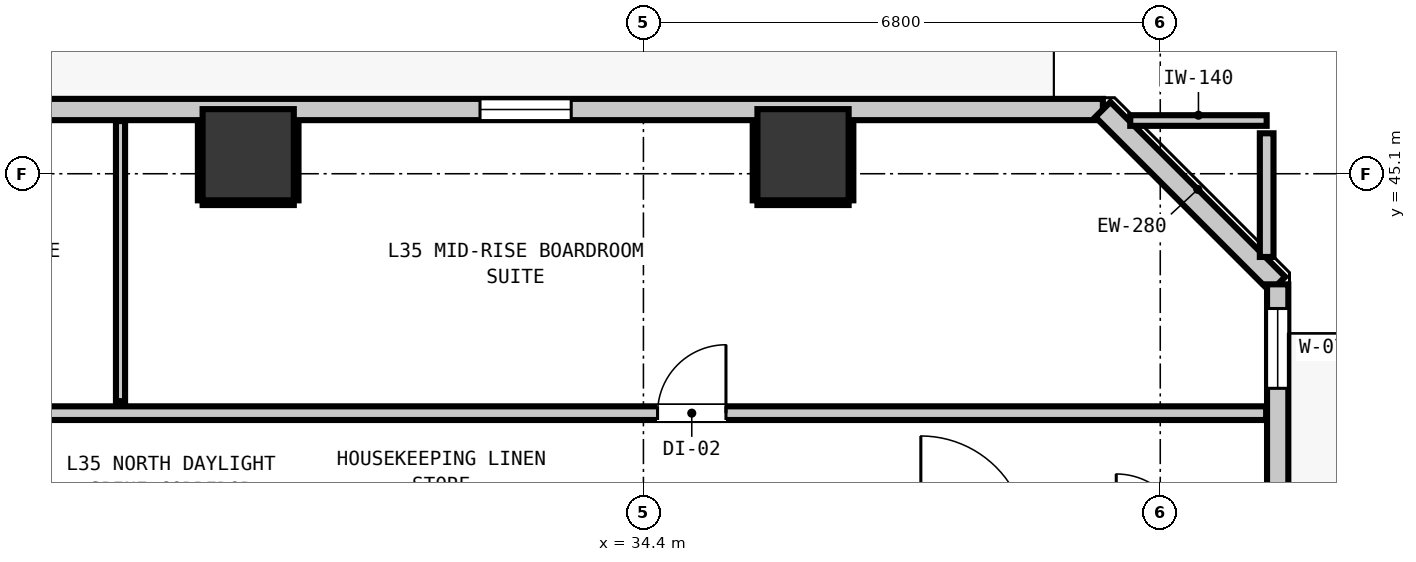
"""IFC4 building model, lengths in metres.
Left out: names, types, materials, properties, quantities, classifications, styles, units other than length and angle.
Written with IfcOpenShell. Run it as: python <this file> out.ifc"""

import sys

from ifc_helpers import new_model, si_unit, direction, frame, frame_2d, origin, origin_2d, place, context, subcontext, project, spatial, rectangle, extrude, element, fill, save


model = new_model("IFC4")
c1 = context("Model", 3, precision=1e-05, world=origin(), true_north=direction((0.0, 1.0)))
c2 = subcontext(c1, "Body", "Model", "MODEL_VIEW")
j1 = project(units=[si_unit("LENGTHUNIT", "METRE"), si_unit("PLANEANGLEUNIT", "RADIAN")], contexts=[c1])
p1 = place(None, origin())
s1 = spatial("IfcSite", under=j1, at=p1, CompositionType="ELEMENT")
p2 = place(p1, origin())
s2 = spatial("IfcBuilding", under=s1, at=p2, CompositionType="ELEMENT")
p3 = place(p2, frame((0.0, 0.0, 122.68)))
s3 = spatial("IfcBuildingStorey", under=s2, at=p3, CompositionType="ELEMENT", Elevation=122.68)
for number, where, z_axis, x_axis in (
    (1, (29.2, 45.35, 0.0), (0.0, 0.0, 1.0), (1.0, 0.0, 0.0)),
    (2, (36.5, 45.35, 0.0), (0.0, 0.0, 1.0), (1.0, 0.0, 0.0)),
):
    element("IfcColumn", number, at=place(p3, frame(where, z_axis=z_axis, x_axis=x_axis)), inside=s3, PredefinedType="COLUMN", context=c2, shape_type="SweptSolid", body=[
        extrude(rectangle(XDim=1.2, YDim=1.2, at=origin_2d()), origin(), (0.0, 0.0, 1.0), 2.9),
    ])
p4 = place(p3, frame((5.355, 45.945, 0.0), z_axis=(0.0, 0.0, 1.0), x_axis=(1.0, 0.0, 0.0)))
e3 = element("IfcWall", 3, at=p4, inside=s3, PredefinedType="STANDARD", context=c2, shape_type="SweptSolid", body=[
    extrude(rectangle(XDim=35.09, YDim=0.28, at=frame_2d((17.545, 0.0))), origin(), (0.0, 0.0, 1.0), 2.9),
])
p5 = place(p4, frame((0.904, 0.0, 0.0)))
e4 = element("IfcOpeningElement", 4, at=p5, cuts=e3, PredefinedType="OPENING", context=c2, shape_type="SweptSolid", body=[
    extrude(rectangle(XDim=1.0, YDim=2.15, at=frame_2d((0.5, 1.075))), frame((0.0, 0.15, 0.0), z_axis=(0.0, -1.0, 0.0), x_axis=(1.0, 0.0, 0.0)), (0.0, 0.0, 1.0), 0.3),
])
p6 = place(p4, frame((3.634, 0.0, 0.85)))
e5 = element("IfcOpeningElement", 5, at=p6, cuts=e3, PredefinedType="OPENING", context=c2, shape_type="SweptSolid", body=[
    extrude(rectangle(XDim=1.2, YDim=1.8, at=frame_2d((0.6, 0.9))), frame((0.0, 0.15, 0.0), z_axis=(0.0, -1.0, 0.0), x_axis=(1.0, 0.0, 0.0)), (0.0, 0.0, 1.0), 0.3),
])
p7 = place(p4, frame((18.455, 0.0, 0.85)))
e6 = element("IfcOpeningElement", 6, at=p7, cuts=e3, PredefinedType="OPENING", context=c2, shape_type="SweptSolid", body=[
    extrude(rectangle(XDim=1.2, YDim=1.8, at=frame_2d((0.6, 0.9))), frame((0.0, 0.15, 0.0), z_axis=(0.0, -1.0, 0.0), x_axis=(1.0, 0.0, 0.0)), (0.0, 0.0, 1.0), 0.3),
])
p8 = place(p4, frame((26.895, 0.0, 0.85)))
e7 = element("IfcOpeningElement", 7, at=p8, cuts=e3, PredefinedType="OPENING", context=c2, shape_type="SweptSolid", body=[
    extrude(rectangle(XDim=1.2, YDim=1.8, at=frame_2d((0.6, 0.9))), frame((0.0, 0.15, 0.0), z_axis=(0.0, -1.0, 0.0), x_axis=(1.0, 0.0, 0.0)), (0.0, 0.0, 1.0), 0.3),
])
p9 = place(p3, frame((40.445, 45.945, 0.0), z_axis=(0.0, 0.0, 1.0), x_axis=(0.707106781187, -0.707106781187, 0.0)))
e8 = element("IfcWall", 8, at=p9, inside=s3, PredefinedType="STANDARD", context=c2, shape_type="SweptSolid", body=[
    extrude(rectangle(XDim=3.253, YDim=0.28, at=frame_2d((1.626, 0.0))), origin(), (0.0, 0.0, 1.0), 2.9),
])
p10 = place(p3, frame((42.745, 43.645, 0.0), z_axis=(0.0, 0.0, 1.0), x_axis=(0.0, -1.0, 0.0)))
e9 = element("IfcWall", 9, at=p10, inside=s3, PredefinedType="STANDARD", context=c2, shape_type="SweptSolid", body=[
    extrude(rectangle(XDim=32.29, YDim=0.28, at=frame_2d((16.145, 0.0))), origin(), (0.0, 0.0, 1.0), 2.9),
])
p11 = place(p10, frame((5.467, 0.0, 0.0)))
e10 = element("IfcOpeningElement", 10, at=p11, cuts=e9, PredefinedType="OPENING", context=c2, shape_type="SweptSolid", body=[
    extrude(rectangle(XDim=1.0, YDim=2.15, at=frame_2d((0.5, 1.075))), frame((0.0, 0.15, 0.0), z_axis=(0.0, -1.0, 0.0), x_axis=(1.0, 0.0, 0.0)), (0.0, 0.0, 1.0), 0.3),
])
p12 = place(p10, frame((28.998, 0.0, 0.85)))
e11 = element("IfcOpeningElement", 11, at=p12, cuts=e9, PredefinedType="OPENING", context=c2, shape_type="SweptSolid", body=[
    extrude(rectangle(XDim=1.2, YDim=1.8, at=frame_2d((0.6, 0.9))), frame((0.0, 0.15, 0.0), z_axis=(0.0, -1.0, 0.0), x_axis=(1.0, 0.0, 0.0)), (0.0, 0.0, 1.0), 0.3),
])
p13 = place(p10, frame((0.318, 0.0, 0.85)))
e12 = element("IfcOpeningElement", 12, at=p13, cuts=e9, PredefinedType="OPENING", context=c2, shape_type="SweptSolid", body=[
    extrude(rectangle(XDim=1.05, YDim=1.65, at=frame_2d((0.525, 0.825))), frame((0.0, 0.15, 0.0), z_axis=(0.0, -1.0, 0.0), x_axis=(1.0, 0.0, 0.0)), (0.0, 0.0, 1.0), 0.3),
])
p14 = place(p10, frame((15.783, 0.0, 0.85)))
e13 = element("IfcOpeningElement", 13, at=p14, cuts=e9, PredefinedType="OPENING", context=c2, shape_type="SweptSolid", body=[
    extrude(rectangle(XDim=1.2, YDim=1.8, at=frame_2d((0.6, 0.9))), frame((0.0, 0.15, 0.0), z_axis=(0.0, -1.0, 0.0), x_axis=(1.0, 0.0, 0.0)), (0.0, 0.0, 1.0), 0.3),
])
p15 = place(p3, frame((3.207, 41.95, 0.0), z_axis=(0.0, 0.0, 1.0), x_axis=(1.0, 0.0, 0.0)))
e14 = element("IfcWall", 14, at=p15, inside=s3, PredefinedType="PARTITIONING", context=c2, shape_type="SweptSolid", body=[
    extrude(rectangle(XDim=39.386, YDim=0.18, at=frame_2d((19.693, 0.0))), origin(), (0.0, 0.0, 1.0), 2.9),
])
p16 = place(p15, frame((4.828, 0.0, 0.0)))
e15 = element("IfcOpeningElement", 15, at=p16, cuts=e14, PredefinedType="OPENING", context=c2, shape_type="SweptSolid", body=[
    extrude(rectangle(XDim=1.0, YDim=2.15, at=frame_2d((0.5, 1.075))), frame((0.0, 0.1, 0.0), z_axis=(0.0, -1.0, 0.0), x_axis=(1.0, 0.0, 0.0)), (0.0, 0.0, 1.0), 0.2),
])
p17 = place(p15, frame((18.355, 0.0, 0.0)))
e16 = element("IfcOpeningElement", 16, at=p17, cuts=e14, PredefinedType="OPENING", context=c2, shape_type="SweptSolid", body=[
    extrude(rectangle(XDim=0.9, YDim=2.1, at=frame_2d((0.45, 1.05))), frame((0.0, 0.1, 0.0), z_axis=(0.0, -1.0, 0.0), x_axis=(1.0, 0.0, 0.0)), (0.0, 0.0, 1.0), 0.2),
])
p18 = place(p15, frame((31.379, 0.0, 0.0)))
e17 = element("IfcOpeningElement", 17, at=p18, cuts=e14, PredefinedType="OPENING", context=c2, shape_type="SweptSolid", body=[
    extrude(rectangle(XDim=0.9, YDim=2.1, at=frame_2d((0.45, 1.05))), frame((0.0, 0.1, 0.0), z_axis=(0.0, -1.0, 0.0), x_axis=(1.0, 0.0, 0.0)), (0.0, 0.0, 1.0), 0.2),
])
p19 = place(p3, frame((40.805, 45.8, 0.0), z_axis=(0.0, 0.0, 1.0), x_axis=(1.0, 0.0, 0.0)))
e18 = element("IfcWall", 18, at=p19, inside=s3, PredefinedType="PARTITIONING", context=c2, shape_type="SweptSolid", body=[
    extrude(rectangle(XDim=1.795, YDim=0.14, at=frame_2d((0.897, 0.0))), origin(), (0.0, 0.0, 1.0), 2.9),
])
p20 = place(p3, frame((42.6, 44.005, 0.0), z_axis=(0.0, 0.0, 1.0), x_axis=(0.0, 1.0, 0.0)))
e19 = element("IfcWall", 19, at=p20, inside=s3, PredefinedType="PARTITIONING", context=c2, shape_type="SweptSolid", body=[
    extrude(rectangle(XDim=1.627, YDim=0.18, at=frame_2d((0.813, 0.0))), origin(), (0.0, 0.0, 1.0), 2.9),
])
p21 = place(p3, frame((27.52, 42.108, 0.0), z_axis=(0.0, 0.0, 1.0), x_axis=(0.0, 1.0, 0.0)))
e20 = element("IfcWall", 20, at=p21, inside=s3, PredefinedType="PARTITIONING", context=c2, shape_type="SweptSolid", body=[
    extrude(rectangle(XDim=3.685, YDim=0.12, at=frame_2d((1.843, 0.0))), origin(), (0.0, 0.0, 1.0), 2.9),
])
p22 = place(p3, frame((28.6, 44.718, 0.0), z_axis=(0.0, 0.0, 1.0), x_axis=(1.0, 0.0, 0.0)))
e21 = element("IfcWall", 21, at=p22, inside=s3, PredefinedType="PARTITIONING", context=c2, shape_type="SweptSolid", body=[
    extrude(rectangle(XDim=1.2, YDim=0.06, at=frame_2d((0.6, 0.0))), origin(), (0.0, 0.0, 1.0), 1.45),
])
for number, where, z_axis, x_axis in (
    (22, (28.568, 44.75, 0.0), (0.0, 0.0, 1.0), (0.0, 1.0, 0.0)),
    (23, (29.832, 44.75, 0.0), (0.0, 0.0, 1.0), (0.0, 1.0, 0.0)),
):
    element("IfcWall", number, at=place(p3, frame(where, z_axis=z_axis, x_axis=x_axis)), inside=s3, PredefinedType="PARTITIONING", context=c2, shape_type="SweptSolid", body=[
        extrude(rectangle(XDim=1.04, YDim=0.06, at=frame_2d((0.52, 0.0))), origin(), (0.0, 0.0, 1.0), 0.905),
    ])
p23 = place(p3, frame((35.9, 44.718, 0.0), z_axis=(0.0, 0.0, 1.0), x_axis=(1.0, 0.0, 0.0)))
e24 = element("IfcWall", 24, at=p23, inside=s3, PredefinedType="PARTITIONING", context=c2, shape_type="SweptSolid", body=[
    extrude(rectangle(XDim=1.2, YDim=0.06, at=frame_2d((0.6, 0.0))), origin(), (0.0, 0.0, 1.0), 1.45),
])
for number, where, z_axis, x_axis in (
    (25, (35.868, 44.75, 0.0), (0.0, 0.0, 1.0), (0.0, 1.0, 0.0)),
    (26, (37.132, 44.75, 0.0), (0.0, 0.0, 1.0), (0.0, 1.0, 0.0)),
):
    element("IfcWall", number, at=place(p3, frame(where, z_axis=z_axis, x_axis=x_axis)), inside=s3, PredefinedType="PARTITIONING", context=c2, shape_type="SweptSolid", body=[
        extrude(rectangle(XDim=1.04, YDim=0.06, at=frame_2d((0.52, 0.0))), origin(), (0.0, 0.0, 1.0), 0.905),
    ])
p24 = place(p8, origin())
e27 = element("IfcWindow", 27, at=p24, inside=s3, PartitioningType="SINGLE_PANEL", PredefinedType="WINDOW", context=c2, shape_type="SweptSolid", body=[
    extrude(rectangle(XDim=1.2, YDim=1.8, at=frame_2d((0.6, 0.9))), frame((0.0, 0.03, 0.0), z_axis=(0.0, -1.0, 0.0), x_axis=(1.0, 0.0, 0.0)), (0.0, 0.0, 1.0), 0.06),
])
fill(e7, e27)
p25 = place(p13, origin())
e28 = element("IfcWindow", 28, at=p25, inside=s3, PartitioningType="SINGLE_PANEL", PredefinedType="WINDOW", context=c2, shape_type="SweptSolid", body=[
    extrude(rectangle(XDim=1.05, YDim=1.65, at=frame_2d((0.525, 0.825))), frame((0.0, 0.03, 0.0), z_axis=(0.0, -1.0, 0.0), x_axis=(1.0, 0.0, 0.0)), (0.0, 0.0, 1.0), 0.06),
])
fill(e12, e28)
p26 = place(p18, origin())
e29 = element("IfcDoor", 29, at=p26, inside=s3, OperationType="SINGLE_SWING_RIGHT", PredefinedType="DOOR", context=c2, shape_type="SweptSolid", body=[
    extrude(rectangle(XDim=0.9, YDim=2.1, at=frame_2d((0.45, 1.05))), frame((0.0, 0.025, 0.0), z_axis=(0.0, -1.0, 0.0), x_axis=(1.0, 0.0, 0.0)), (0.0, 0.0, 1.0), 0.05),
])
fill(e17, e29)
save(model, sys.argv[1])
